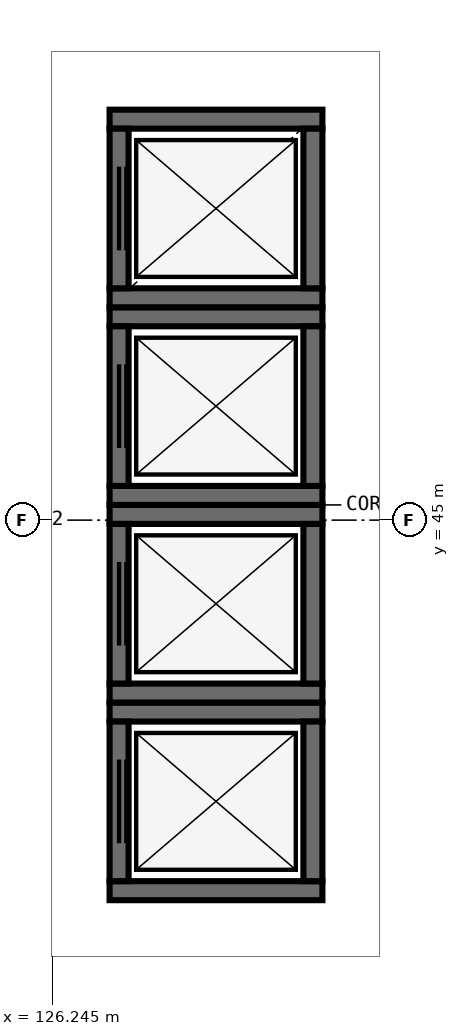
"""IFC4 building model, lengths in metres.
Left out: names, types, materials, properties, quantities, classifications, styles, units other than length and angle.
Written with IfcOpenShell. Run it as: python <this file> out.ifc"""

import sys

from ifc_helpers import new_model, si_unit, direction, frame, frame_2d, origin, place, context, subcontext, project, spatial, rectangle, extrude, element, fill, save


model = new_model("IFC4")
c1 = context("Model", 3, precision=1e-05, world=origin(), true_north=direction((0.0, 1.0)))
c2 = subcontext(c1, "Body", "Model", "MODEL_VIEW")
j1 = project(units=[si_unit("LENGTHUNIT", "METRE"), si_unit("PLANEANGLEUNIT", "RADIAN")], contexts=[c1])
p1 = place(None, origin())
s1 = spatial("IfcSite", under=j1, at=p1, CompositionType="ELEMENT")
p2 = place(p1, origin())
s2 = spatial("IfcBuilding", under=s1, at=p2, CompositionType="ELEMENT")
p3 = place(p2, frame((0.0, 0.0, 18.0)))
s3 = spatial("IfcBuildingStorey", under=s2, at=p3, CompositionType="ELEMENT", Elevation=18.0)
for number, where, z_axis, x_axis in (
    (1, (127.0, 40.125, 0.0), (0.0, 0.0, 1.0), (1.0, 0.0, 0.0)),
    (2, (129.8, 42.475, 0.0), (0.0, 0.0, 1.0), (-1.0, 0.0, 0.0)),
):
    element("IfcWall", number, at=place(p3, frame(where, z_axis=z_axis, x_axis=x_axis)), inside=s3, PredefinedType="SHEAR", context=c2, shape_type="SweptSolid", body=[
        extrude(rectangle(XDim=2.8, YDim=0.25, at=frame_2d((1.4, 0.0))), origin(), (0.0, 0.0, 1.0), 5.4),
    ])
p4 = place(p3, frame((127.125, 42.35, 0.0), z_axis=(0.0, 0.0, 1.0), x_axis=(0.0, -1.0, 0.0)))
e3 = element("IfcWall", 3, at=p4, inside=s3, PredefinedType="SHEAR", context=c2, shape_type="SweptSolid", body=[
    extrude(rectangle(XDim=2.1, YDim=0.25, at=frame_2d((1.05, 0.0))), origin(), (0.0, 0.0, 1.0), 5.4),
])
p5 = place(p4, frame((0.5, 0.0, 0.0)))
e4 = element("IfcOpeningElement", 4, at=p5, cuts=e3, PredefinedType="OPENING", context=c2, shape_type="SweptSolid", body=[
    extrude(rectangle(XDim=1.1, YDim=2.2, at=frame_2d((0.55, 1.1))), frame((0.0, 0.14, 0.0), z_axis=(0.0, -1.0, 0.0), x_axis=(1.0, 0.0, 0.0)), (0.0, 0.0, 1.0), 0.28),
])
p6 = place(p3, frame((129.675, 40.25, 0.0), z_axis=(0.0, 0.0, 1.0), x_axis=(0.0, 1.0, 0.0)))
e5 = element("IfcWall", 5, at=p6, inside=s3, PredefinedType="SHEAR", context=c2, shape_type="SweptSolid", body=[
    extrude(rectangle(XDim=2.1, YDim=0.25, at=frame_2d((1.05, 0.0))), origin(), (0.0, 0.0, 1.0), 5.4),
])
for number, where, z_axis, x_axis in (
    (6, (127.0, 42.725, 0.0), (0.0, 0.0, 1.0), (1.0, 0.0, 0.0)),
    (7, (129.8, 45.075, 0.0), (0.0, 0.0, 1.0), (-1.0, 0.0, 0.0)),
):
    element("IfcWall", number, at=place(p3, frame(where, z_axis=z_axis, x_axis=x_axis)), inside=s3, PredefinedType="SHEAR", context=c2, shape_type="SweptSolid", body=[
        extrude(rectangle(XDim=2.8, YDim=0.25, at=frame_2d((1.4, 0.0))), origin(), (0.0, 0.0, 1.0), 5.4),
    ])
p7 = place(p3, frame((127.125, 44.95, 0.0), z_axis=(0.0, 0.0, 1.0), x_axis=(0.0, -1.0, 0.0)))
e8 = element("IfcWall", 8, at=p7, inside=s3, PredefinedType="SHEAR", context=c2, shape_type="SweptSolid", body=[
    extrude(rectangle(XDim=2.1, YDim=0.25, at=frame_2d((1.05, 0.0))), origin(), (0.0, 0.0, 1.0), 5.4),
])
p8 = place(p7, frame((0.5, 0.0, 0.0)))
e9 = element("IfcOpeningElement", 9, at=p8, cuts=e8, PredefinedType="OPENING", context=c2, shape_type="SweptSolid", body=[
    extrude(rectangle(XDim=1.1, YDim=2.2, at=frame_2d((0.55, 1.1))), frame((0.0, 0.14, 0.0), z_axis=(0.0, -1.0, 0.0), x_axis=(1.0, 0.0, 0.0)), (0.0, 0.0, 1.0), 0.28),
])
p9 = place(p3, frame((129.675, 42.85, 0.0), z_axis=(0.0, 0.0, 1.0), x_axis=(0.0, 1.0, 0.0)))
e10 = element("IfcWall", 10, at=p9, inside=s3, PredefinedType="SHEAR", context=c2, shape_type="SweptSolid", body=[
    extrude(rectangle(XDim=2.1, YDim=0.25, at=frame_2d((1.05, 0.0))), origin(), (0.0, 0.0, 1.0), 5.4),
])
for number, where, z_axis, x_axis in (
    (11, (127.0, 45.325, 0.0), (0.0, 0.0, 1.0), (1.0, 0.0, 0.0)),
    (12, (129.8, 47.675, 0.0), (0.0, 0.0, 1.0), (-1.0, 0.0, 0.0)),
):
    element("IfcWall", number, at=place(p3, frame(where, z_axis=z_axis, x_axis=x_axis)), inside=s3, PredefinedType="SHEAR", context=c2, shape_type="SweptSolid", body=[
        extrude(rectangle(XDim=2.8, YDim=0.25, at=frame_2d((1.4, 0.0))), origin(), (0.0, 0.0, 1.0), 5.4),
    ])
p10 = place(p3, frame((127.125, 47.55, 0.0), z_axis=(0.0, 0.0, 1.0), x_axis=(0.0, -1.0, 0.0)))
e13 = element("IfcWall", 13, at=p10, inside=s3, PredefinedType="SHEAR", context=c2, shape_type="SweptSolid", body=[
    extrude(rectangle(XDim=2.1, YDim=0.25, at=frame_2d((1.05, 0.0))), origin(), (0.0, 0.0, 1.0), 5.4),
])
p11 = place(p10, frame((0.5, 0.0, 0.0)))
e14 = element("IfcOpeningElement", 14, at=p11, cuts=e13, PredefinedType="OPENING", context=c2, shape_type="SweptSolid", body=[
    extrude(rectangle(XDim=1.1, YDim=2.2, at=frame_2d((0.55, 1.1))), frame((0.0, 0.14, 0.0), z_axis=(0.0, -1.0, 0.0), x_axis=(1.0, 0.0, 0.0)), (0.0, 0.0, 1.0), 0.28),
])
p12 = place(p3, frame((129.675, 45.45, 0.0), z_axis=(0.0, 0.0, 1.0), x_axis=(0.0, 1.0, 0.0)))
e15 = element("IfcWall", 15, at=p12, inside=s3, PredefinedType="SHEAR", context=c2, shape_type="SweptSolid", body=[
    extrude(rectangle(XDim=2.1, YDim=0.25, at=frame_2d((1.05, 0.0))), origin(), (0.0, 0.0, 1.0), 5.4),
])
for number, where, z_axis, x_axis in (
    (16, (127.0, 47.925, 0.0), (0.0, 0.0, 1.0), (1.0, 0.0, 0.0)),
    (17, (129.8, 50.275, 0.0), (0.0, 0.0, 1.0), (-1.0, 0.0, 0.0)),
):
    element("IfcWall", number, at=place(p3, frame(where, z_axis=z_axis, x_axis=x_axis)), inside=s3, PredefinedType="SHEAR", context=c2, shape_type="SweptSolid", body=[
        extrude(rectangle(XDim=2.8, YDim=0.25, at=frame_2d((1.4, 0.0))), origin(), (0.0, 0.0, 1.0), 5.4),
    ])
p13 = place(p3, frame((127.125, 50.15, 0.0), z_axis=(0.0, 0.0, 1.0), x_axis=(0.0, -1.0, 0.0)))
e18 = element("IfcWall", 18, at=p13, inside=s3, PredefinedType="SHEAR", context=c2, shape_type="SweptSolid", body=[
    extrude(rectangle(XDim=2.1, YDim=0.25, at=frame_2d((1.05, 0.0))), origin(), (0.0, 0.0, 1.0), 5.4),
])
p14 = place(p13, frame((0.5, 0.0, 0.0)))
e19 = element("IfcOpeningElement", 19, at=p14, cuts=e18, PredefinedType="OPENING", context=c2, shape_type="SweptSolid", body=[
    extrude(rectangle(XDim=1.1, YDim=2.2, at=frame_2d((0.55, 1.1))), frame((0.0, 0.14, 0.0), z_axis=(0.0, -1.0, 0.0), x_axis=(1.0, 0.0, 0.0)), (0.0, 0.0, 1.0), 0.28),
])
p15 = place(p3, frame((129.675, 48.05, 0.0), z_axis=(0.0, 0.0, 1.0), x_axis=(0.0, 1.0, 0.0)))
e20 = element("IfcWall", 20, at=p15, inside=s3, PredefinedType="SHEAR", context=c2, shape_type="SweptSolid", body=[
    extrude(rectangle(XDim=2.1, YDim=0.25, at=frame_2d((1.05, 0.0))), origin(), (0.0, 0.0, 1.0), 5.4),
])
p16 = place(p5, origin())
e21 = element("IfcDoor", 21, at=p16, inside=s3, OperationType="DOUBLE_DOOR_SLIDING", PredefinedType="DOOR", context=c2, shape_type="SweptSolid", body=[
    extrude(rectangle(XDim=1.1, YDim=2.2, at=frame_2d((0.55, 1.1))), frame((0.0, 0.025, 0.0), z_axis=(0.0, -1.0, 0.0), x_axis=(1.0, 0.0, 0.0)), (0.0, 0.0, 1.0), 0.05),
])
fill(e4, e21)
p17 = place(p8, origin())
e22 = element("IfcDoor", 22, at=p17, inside=s3, OperationType="DOUBLE_DOOR_SLIDING", PredefinedType="DOOR", context=c2, shape_type="SweptSolid", body=[
    extrude(rectangle(XDim=1.1, YDim=2.2, at=frame_2d((0.55, 1.1))), frame((0.0, 0.025, 0.0), z_axis=(0.0, -1.0, 0.0), x_axis=(1.0, 0.0, 0.0)), (0.0, 0.0, 1.0), 0.05),
])
fill(e9, e22)
p18 = place(p11, origin())
e23 = element("IfcDoor", 23, at=p18, inside=s3, OperationType="DOUBLE_DOOR_SLIDING", PredefinedType="DOOR", context=c2, shape_type="SweptSolid", body=[
    extrude(rectangle(XDim=1.1, YDim=2.2, at=frame_2d((0.55, 1.1))), frame((0.0, 0.025, 0.0), z_axis=(0.0, -1.0, 0.0), x_axis=(1.0, 0.0, 0.0)), (0.0, 0.0, 1.0), 0.05),
])
fill(e14, e23)
p19 = place(p14, origin())
e24 = element("IfcDoor", 24, at=p19, inside=s3, OperationType="DOUBLE_DOOR_SLIDING", PredefinedType="DOOR", context=c2, shape_type="SweptSolid", body=[
    extrude(rectangle(XDim=1.1, YDim=2.2, at=frame_2d((0.55, 1.1))), frame((0.0, 0.025, 0.0), z_axis=(0.0, -1.0, 0.0), x_axis=(1.0, 0.0, 0.0)), (0.0, 0.0, 1.0), 0.05),
])
fill(e19, e24)
save(model, sys.argv[1])
